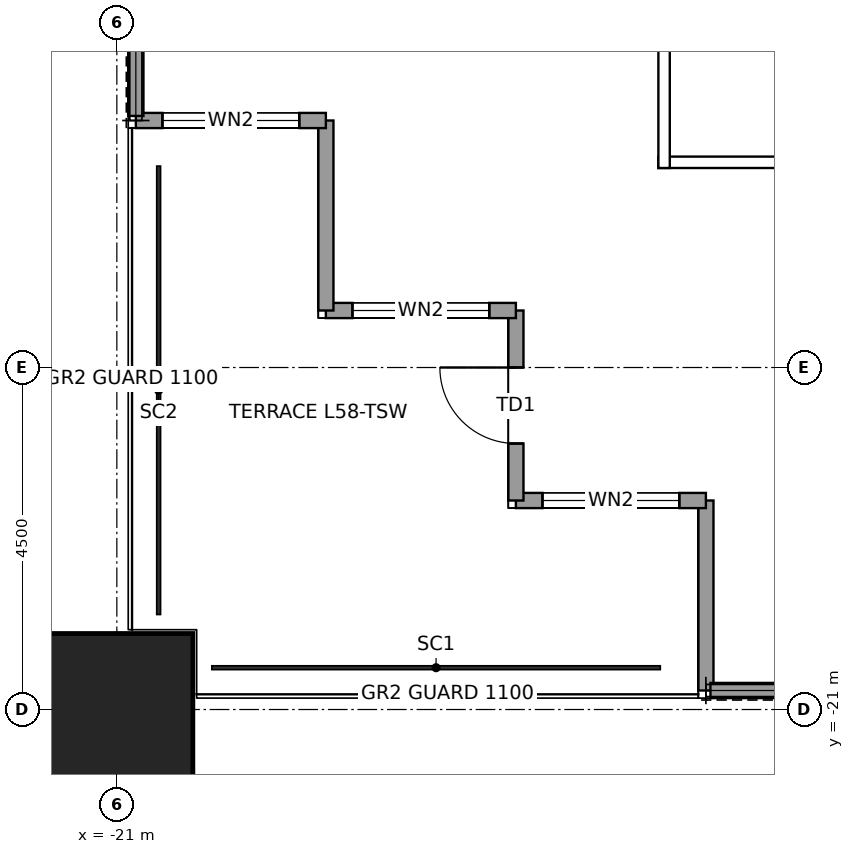
"""IFC4 building model, lengths in metres.
Left out: names, types, materials, properties, quantities, classifications, styles, units other than length and angle.
Written with IfcOpenShell. Run it as: python <this file> out.ifc"""

import sys

from ifc_helpers import new_model, si_unit, direction, frame, frame_2d, origin, origin_2d, place, context, subcontext, project, spatial, rectangle, hollow_rectangle, extrude, element, fill, save


model = new_model("IFC4")
c1 = context("Model", 3, precision=1e-05, world=origin(), true_north=direction((0.0, 1.0)))
c2 = subcontext(c1, "Body", "Model", "MODEL_VIEW")
j1 = project(units=[si_unit("LENGTHUNIT", "METRE"), si_unit("PLANEANGLEUNIT", "RADIAN")], contexts=[c1])
p1 = place(None, origin())
s1 = spatial("IfcSite", under=j1, at=p1, CompositionType="ELEMENT")
p2 = place(p1, origin())
s2 = spatial("IfcBuilding", under=s1, at=p2, CompositionType="ELEMENT")
p3 = place(p2, frame((0.0, 0.0, 267.9)))
s3 = spatial("IfcBuildingStorey", under=s2, at=p3, CompositionType="ELEMENT", Elevation=267.9)
p4 = place(p3, frame((-21.0, -21.0, 0.0), z_axis=(0.0, 0.0, 1.0), x_axis=(1.0, 0.0, 0.0)))
e1 = element("IfcColumn", 1, at=p4, inside=s3, PredefinedType="COLUMN", context=c2, shape_type="SweptSolid", body=[
    extrude(hollow_rectangle(XDim=2.0, YDim=2.0, WallThickness=0.095, at=origin_2d()), origin(), (0.0, 0.0, 1.0), 4.0),
])
p5 = place(p3, frame((-13.25, -20.75, 0.0), z_axis=(0.0, 0.0, 1.0), x_axis=(0.0, 1.0, 0.0)))
e2 = element("IfcWall", 2, at=p5, inside=s3, PredefinedType="SOLIDWALL", context=c2, shape_type="SweptSolid", body=[
    extrude(rectangle(XDim=2.5, YDim=0.2, at=frame_2d((1.25, 0.0))), origin(), (0.0, 0.0, 1.0), 3.85),
])
p6 = place(p3, frame((-13.25, -18.25, 0.0), z_axis=(0.0, 0.0, 1.0), x_axis=(-1.0, 0.0, 0.0)))
e3 = element("IfcWall", 3, at=p6, inside=s3, PredefinedType="SOLIDWALL", context=c2, shape_type="SweptSolid", body=[
    extrude(rectangle(XDim=2.5, YDim=0.2, at=frame_2d((1.25, 0.0))), origin(), (0.0, 0.0, 1.0), 3.85),
])
p7 = place(p6, frame((0.35, 0.0, 0.3)))
e4 = element("IfcOpeningElement", 4, at=p7, cuts=e3, PredefinedType="OPENING", context=c2, shape_type="SweptSolid", body=[
    extrude(rectangle(XDim=1.8, YDim=2.4, at=frame_2d((0.9, 1.2))), frame((0.0, 0.11, 0.0), z_axis=(0.0, -1.0, 0.0), x_axis=(1.0, 0.0, 0.0)), (0.0, 0.0, 1.0), 0.22),
])
p8 = place(p3, frame((-15.75, -18.25, 0.0), z_axis=(0.0, 0.0, 1.0), x_axis=(0.0, 1.0, 0.0)))
e5 = element("IfcWall", 5, at=p8, inside=s3, PredefinedType="SOLIDWALL", context=c2, shape_type="SweptSolid", body=[
    extrude(rectangle(XDim=2.5, YDim=0.2, at=frame_2d((1.25, 0.0))), origin(), (0.0, 0.0, 1.0), 3.317),
])
p9 = place(p8, frame((0.75, 0.0, 0.0)))
e6 = element("IfcOpeningElement", 6, at=p9, cuts=e5, PredefinedType="OPENING", context=c2, shape_type="SweptSolid", body=[
    extrude(rectangle(XDim=1.0, YDim=2.4, at=frame_2d((0.5, 1.2))), frame((0.0, 0.11, 0.0), z_axis=(0.0, -1.0, 0.0), x_axis=(1.0, 0.0, 0.0)), (0.0, 0.0, 1.0), 0.22),
])
p10 = place(p3, frame((-15.75, -15.75, 0.0), z_axis=(0.0, 0.0, 1.0), x_axis=(-1.0, 0.0, 0.0)))
e7 = element("IfcWall", 7, at=p10, inside=s3, PredefinedType="SOLIDWALL", context=c2, shape_type="SweptSolid", body=[
    extrude(rectangle(XDim=2.5, YDim=0.2, at=frame_2d((1.25, 0.0))), origin(), (0.0, 0.0, 1.0), 3.85),
])
p11 = place(p10, frame((0.35, 0.0, 0.3)))
e8 = element("IfcOpeningElement", 8, at=p11, cuts=e7, PredefinedType="OPENING", context=c2, shape_type="SweptSolid", body=[
    extrude(rectangle(XDim=1.8, YDim=2.4, at=frame_2d((0.9, 1.2))), frame((0.0, 0.11, 0.0), z_axis=(0.0, -1.0, 0.0), x_axis=(1.0, 0.0, 0.0)), (0.0, 0.0, 1.0), 0.22),
])
p12 = place(p3, frame((-18.25, -15.75, 0.0), z_axis=(0.0, 0.0, 1.0), x_axis=(0.0, 1.0, 0.0)))
e9 = element("IfcWall", 9, at=p12, inside=s3, PredefinedType="SOLIDWALL", context=c2, shape_type="SweptSolid", body=[
    extrude(rectangle(XDim=2.5, YDim=0.2, at=frame_2d((1.25, 0.0))), origin(), (0.0, 0.0, 1.0), 3.85),
])
p13 = place(p3, frame((-18.25, -13.25, 0.0), z_axis=(0.0, 0.0, 1.0), x_axis=(-1.0, 0.0, 0.0)))
e10 = element("IfcWall", 10, at=p13, inside=s3, PredefinedType="SOLIDWALL", context=c2, shape_type="SweptSolid", body=[
    extrude(rectangle(XDim=2.5, YDim=0.2, at=frame_2d((1.25, 0.0))), origin(), (0.0, 0.0, 1.0), 3.85),
])
p14 = place(p13, frame((0.35, 0.0, 0.3)))
e11 = element("IfcOpeningElement", 11, at=p14, cuts=e10, PredefinedType="OPENING", context=c2, shape_type="SweptSolid", body=[
    extrude(rectangle(XDim=1.8, YDim=2.4, at=frame_2d((0.9, 1.2))), frame((0.0, 0.11, 0.0), z_axis=(0.0, -1.0, 0.0), x_axis=(1.0, 0.0, 0.0)), (0.0, 0.0, 1.0), 0.22),
])
for number, where, z_axis, x_axis in (
    (12, (-10.405, -20.75, 0.0), (0.0, 0.0, 1.0), (-1.0, 0.0, 0.0)),
    (13, (-20.75, -13.19, 0.0), (0.0, 0.0, 1.0), (0.0, 1.0, 0.0)),
):
    element("IfcWall", number, at=place(p3, frame(where, z_axis=z_axis, x_axis=x_axis)), inside=s3, PredefinedType="SOLIDWALL", context=c2, shape_type="SweptSolid", body=[
        extrude(rectangle(XDim=2.785, YDim=0.2, at=frame_2d((1.393, 0.0))), origin(), (0.0, 0.0, 1.0), 3.85),
    ])
p15 = place(p3, frame((-13.875, -13.8, 0.0), z_axis=(0.0, 0.0, 1.0), x_axis=(1.0, 0.0, 0.0)))
e14 = element("IfcWall", 14, at=p15, inside=s3, PredefinedType="PARTITIONING", context=c2, shape_type="SweptSolid", body=[
    extrude(rectangle(XDim=27.75, YDim=0.15, at=frame_2d((13.875, 0.0))), origin(), (0.0, 0.0, 1.0), 3.85),
])
p16 = place(p15, frame((3.975, 0.0, 0.0)))
e15 = element("IfcOpeningElement", 15, at=p16, cuts=e14, PredefinedType="OPENING", context=c2, shape_type="SweptSolid", body=[
    extrude(rectangle(XDim=1.0, YDim=2.4, at=frame_2d((0.5, 1.2))), frame((0.0, 0.085, 0.0), z_axis=(0.0, -1.0, 0.0), x_axis=(1.0, 0.0, 0.0)), (0.0, 0.0, 1.0), 0.17),
])
p17 = place(p3, frame((-13.8, -13.875, 0.0), z_axis=(0.0, 0.0, 1.0), x_axis=(0.0, 1.0, 0.0)))
e16 = element("IfcWall", 16, at=p17, inside=s3, PredefinedType="PARTITIONING", context=c2, shape_type="SweptSolid", body=[
    extrude(rectangle(XDim=27.75, YDim=0.15, at=frame_2d((13.875, 0.0))), origin(), (0.0, 0.0, 1.0), 3.85),
])
p18 = place(p7, origin())
e17 = element("IfcWindow", 17, at=p18, inside=s3, PartitioningType="SINGLE_PANEL", PredefinedType="WINDOW", context=c2, shape_type="SweptSolid", body=[
    extrude(rectangle(XDim=1.8, YDim=2.4, at=frame_2d((0.9, 1.2))), frame((0.0, 0.03, 0.0), z_axis=(0.0, -1.0, 0.0), x_axis=(1.0, 0.0, 0.0)), (0.0, 0.0, 1.0), 0.06),
])
fill(e4, e17)
p19 = place(p9, origin())
e18 = element("IfcDoor", 18, at=p19, inside=s3, OperationType="SINGLE_SWING_RIGHT", PredefinedType="DOOR", context=c2, shape_type="SweptSolid", body=[
    extrude(rectangle(XDim=1.0, YDim=2.4, at=frame_2d((0.5, 1.2))), frame((0.0, 0.025, 0.0), z_axis=(0.0, -1.0, 0.0), x_axis=(1.0, 0.0, 0.0)), (0.0, 0.0, 1.0), 0.05),
])
fill(e6, e18)
p20 = place(p11, origin())
e19 = element("IfcWindow", 19, at=p20, inside=s3, PartitioningType="SINGLE_PANEL", PredefinedType="WINDOW", context=c2, shape_type="SweptSolid", body=[
    extrude(rectangle(XDim=1.8, YDim=2.4, at=frame_2d((0.9, 1.2))), frame((0.0, 0.03, 0.0), z_axis=(0.0, -1.0, 0.0), x_axis=(1.0, 0.0, 0.0)), (0.0, 0.0, 1.0), 0.06),
])
fill(e8, e19)
p21 = place(p14, origin())
e20 = element("IfcWindow", 20, at=p21, inside=s3, PartitioningType="SINGLE_PANEL", PredefinedType="WINDOW", context=c2, shape_type="SweptSolid", body=[
    extrude(rectangle(XDim=1.8, YDim=2.4, at=frame_2d((0.9, 1.2))), frame((0.0, 0.03, 0.0), z_axis=(0.0, -1.0, 0.0), x_axis=(1.0, 0.0, 0.0)), (0.0, 0.0, 1.0), 0.06),
])
fill(e11, e20)
save(model, sys.argv[1])
